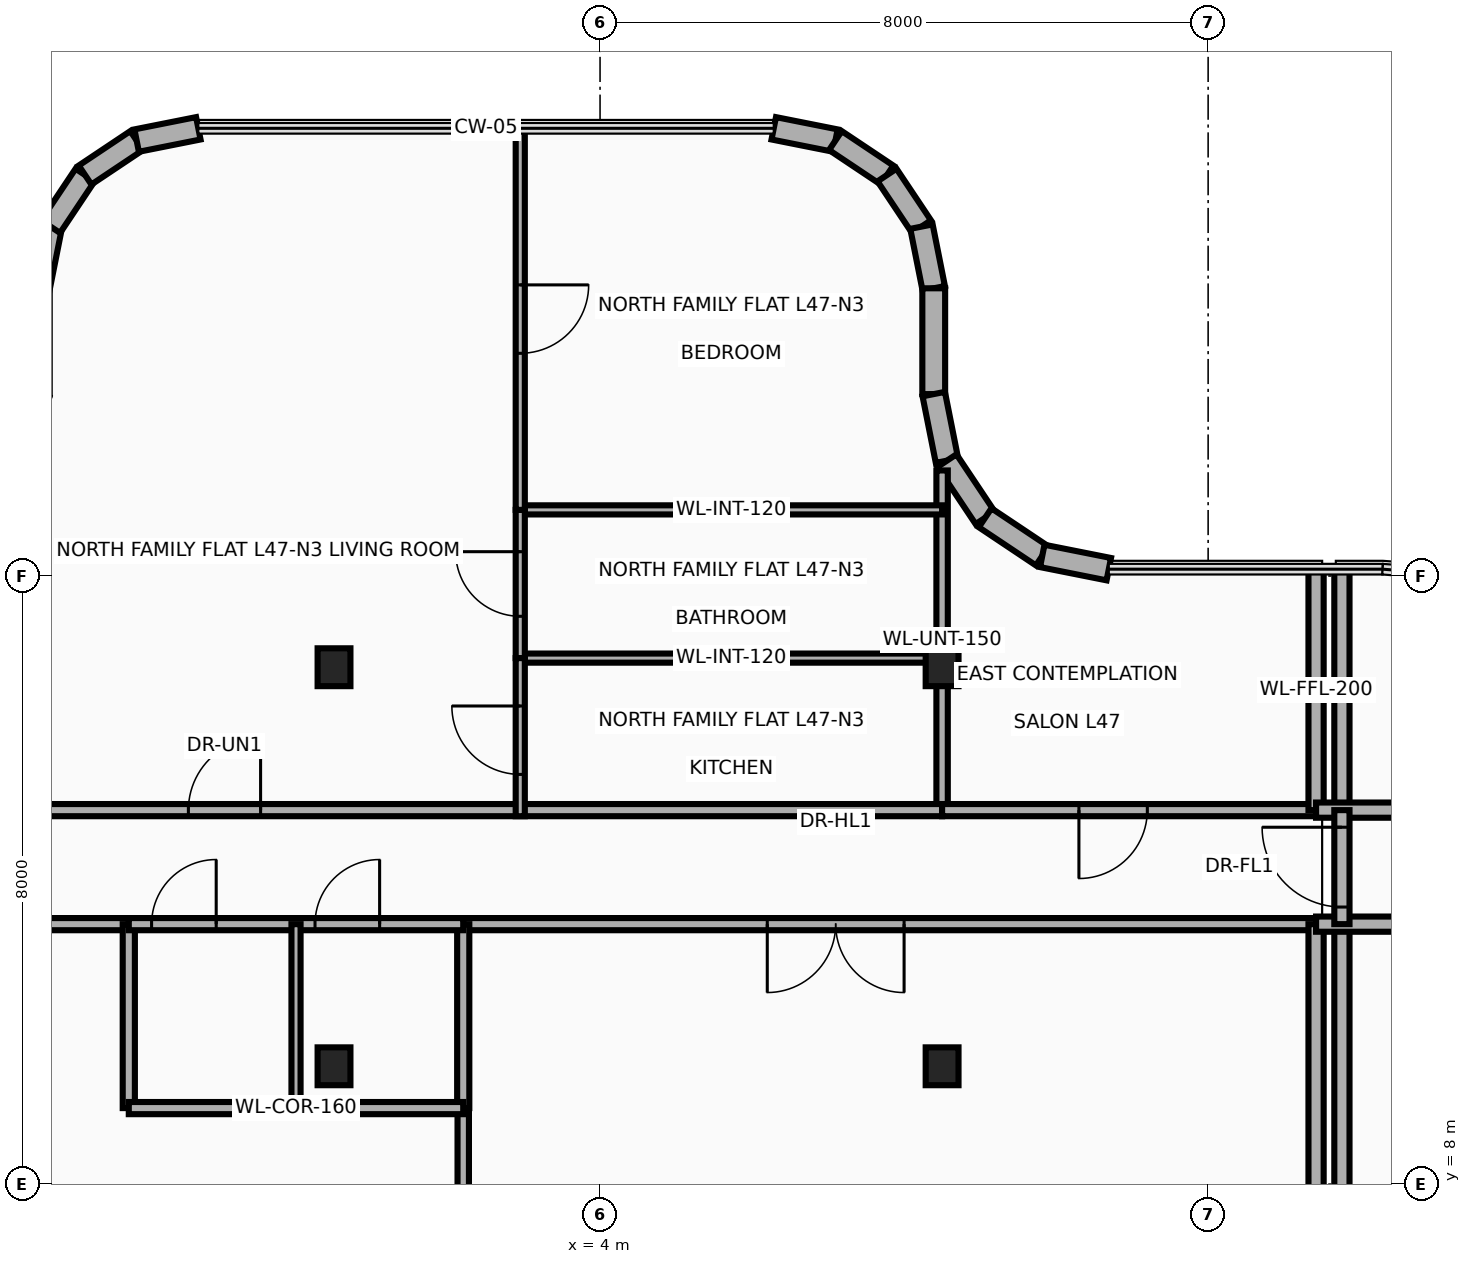
"""IFC4 building model, lengths in metres.
Left out: names, types, materials, properties, quantities, classifications, styles, units other than length and angle.
Written with IfcOpenShell. Run it as: python <this file> out.ifc"""

import sys

from ifc_helpers import new_model, si_unit, direction, frame, frame_2d, origin, origin_2d, place, context, subcontext, project, spatial, rectangle, i_section, extrude, source, transform, mapped, element, fill, save


model = new_model("IFC4")
c1 = context("Model", 3, precision=1e-05, world=origin(), true_north=direction((0.0, 1.0)))
c2 = subcontext(c1, "Body", "Model", "MODEL_VIEW")
j1 = project(units=[si_unit("LENGTHUNIT", "METRE"), si_unit("PLANEANGLEUNIT", "RADIAN")], contexts=[c1])
p1 = place(None, origin())
s1 = spatial("IfcSite", under=j1, at=p1, CompositionType="ELEMENT")
p2 = place(p1, origin())
s2 = spatial("IfcBuilding", under=s1, at=p2, CompositionType="ELEMENT")
p3 = place(p2, frame((0.0, 0.0, 184.45)))
s3 = spatial("IfcBuildingStorey", under=s2, at=p3, CompositionType="ELEMENT", Elevation=184.45)
m1 = source(origin(), c2, "Body", "SweptSolid", [
    extrude(i_section(OverallWidth=0.432, OverallDepth=0.498, WebThickness=0.056, FlangeThickness=0.089, at=origin_2d()), origin(), (0.0, 0.0, 1.0), 3.95),
])
for number, where, z_axis, x_axis in (
    (1, (8.5, 9.55, 0.0), (0.0, 0.0, 1.0), (1.0, 0.0, 0.0)),
    (2, (8.5, 14.8, 0.0), (0.0, 0.0, 1.0), (1.0, 0.0, 0.0)),
    (3, (0.5, 9.55, 0.0), (0.0, 0.0, 1.0), (1.0, 0.0, 0.0)),
    (4, (0.5, 14.8, 0.0), (0.0, 0.0, 1.0), (1.0, 0.0, 0.0)),
):
    element("IfcColumn", number, at=place(p3, frame(where, z_axis=z_axis, x_axis=x_axis)), inside=s3, PredefinedType="COLUMN", context=c2, shape_type="MappedRepresentation", body=[
        mapped(m1, transform((0.0, 0.0, 0.0), x_axis=(1.0, 0.0, 0.0), y_axis=(0.0, 1.0, 0.0), z_axis=(0.0, 0.0, 1.0), scale=1.0)),
    ])
p4 = place(p3, frame((-3.39, 19.785, 0.0), z_axis=(0.0, 0.0, 1.0), x_axis=(0.195094354541, 0.980784478276, 0.0)))
e5 = element("IfcWall", 5, at=p4, inside=s3, PredefinedType="SOLIDWALL", context=c2, shape_type="SweptSolid", body=[
    extrude(rectangle(XDim=0.827, YDim=0.3, at=frame_2d((0.414, 0.0))), origin(), (0.0, 0.0, 1.0), 2.615),
])
p5 = place(p3, frame((-3.229, 20.596, 0.0), z_axis=(0.0, 0.0, 1.0), x_axis=(0.55545926088, 0.831543750805, 0.0)))
e6 = element("IfcWall", 6, at=p5, inside=s3, PredefinedType="SOLIDWALL", context=c2, shape_type="SweptSolid", body=[
    extrude(rectangle(XDim=0.816, YDim=0.3, at=frame_2d((0.408, 0.0))), origin(), (0.0, 0.0, 1.0), 2.615),
])
p6 = place(p3, frame((-2.775, 21.275, 0.0), z_axis=(0.0, 0.0, 1.0), x_axis=(0.831543750805, 0.55545926088, 0.0)))
e7 = element("IfcWall", 7, at=p6, inside=s3, PredefinedType="SOLIDWALL", context=c2, shape_type="SweptSolid", body=[
    extrude(rectangle(XDim=0.816, YDim=0.3, at=frame_2d((0.408, 0.0))), origin(), (0.0, 0.0, 1.0), 3.63),
])
for number, where, z_axis, x_axis in (
    (8, (-2.096, 21.729, 0.0), (0.0, 0.0, 1.0), (0.981, 0.195, 0.0)),
    (9, (6.285, 21.89, 0.0), (0.0, 0.0, 1.0), (0.981, -0.195, 0.0)),
):
    element("IfcWall", number, at=place(p3, frame(where, z_axis=z_axis, x_axis=x_axis)), inside=s3, PredefinedType="SOLIDWALL", context=c2, shape_type="SweptSolid", body=[
        extrude(rectangle(XDim=0.827, YDim=0.3, at=frame_2d((0.414, 0.0))), origin(), (0.0, 0.0, 1.0), 3.076),
    ])
p7 = place(p3, frame((7.096, 21.729, 0.0), z_axis=(0.0, 0.0, 1.0), x_axis=(0.831543750805, -0.55545926088, 0.0)))
e10 = element("IfcWall", 10, at=p7, inside=s3, PredefinedType="SOLIDWALL", context=c2, shape_type="SweptSolid", body=[
    extrude(rectangle(XDim=0.816, YDim=0.3, at=frame_2d((0.408, 0.0))), origin(), (0.0, 0.0, 1.0), 3.63),
])
p8 = place(p3, frame((7.775, 21.275, 0.0), z_axis=(0.0, 0.0, 1.0), x_axis=(0.55545926088, -0.831543750805, 0.0)))
e11 = element("IfcWall", 11, at=p8, inside=s3, PredefinedType="SOLIDWALL", context=c2, shape_type="SweptSolid", body=[
    extrude(rectangle(XDim=0.816, YDim=0.3, at=frame_2d((0.408, 0.0))), origin(), (0.0, 0.0, 1.0), 2.615),
])
p9 = place(p3, frame((8.229, 20.596, 0.0), z_axis=(0.0, 0.0, 1.0), x_axis=(0.195094354541, -0.980784478276, 0.0)))
e12 = element("IfcWall", 12, at=p9, inside=s3, PredefinedType="SOLIDWALL", context=c2, shape_type="SweptSolid", body=[
    extrude(rectangle(XDim=0.827, YDim=0.3, at=frame_2d((0.414, 0.0))), origin(), (0.0, 0.0, 1.0), 2.615),
])
p10 = place(p3, frame((8.39, 19.785, 0.0), z_axis=(0.0, 0.0, 1.0), x_axis=(0.0, -1.0, 0.0)))
e13 = element("IfcWall", 13, at=p10, inside=s3, PredefinedType="SOLIDWALL", context=c2, shape_type="SweptSolid", body=[
    extrude(rectangle(XDim=1.392, YDim=0.3, at=frame_2d((0.696, 0.0))), origin(), (0.0, 0.0, 1.0), 2.615),
])
p11 = place(p3, frame((8.39, 18.393, 0.0), z_axis=(0.0, 0.0, 1.0), x_axis=(0.195222179208, -0.980759043163, 0.0)))
e14 = element("IfcWall", 14, at=p11, inside=s3, PredefinedType="SOLIDWALL", context=c2, shape_type="SweptSolid", body=[
    extrude(rectangle(XDim=0.893, YDim=0.3, at=frame_2d((0.446, 0.0))), origin(), (0.0, 0.0, 1.0), 2.615),
])
for number, where, z_axis, x_axis in (
    (15, (8.564, 17.518, 0.0), (0.0, 0.0, 1.0), (0.555, -0.832, 0.0)),
    (16, (9.066, 16.766, 0.0), (0.0, 0.0, 1.0), (0.832, -0.555, 0.0)),
):
    element("IfcWall", number, at=place(p3, frame(where, z_axis=z_axis, x_axis=x_axis)), inside=s3, PredefinedType="SOLIDWALL", context=c2, shape_type="SweptSolid", body=[
        extrude(rectangle(XDim=0.904, YDim=0.3, at=frame_2d((0.452, 0.0))), origin(), (0.0, 0.0, 1.0), 2.615),
    ])
p12 = place(p3, frame((9.818, 16.264, 0.0), z_axis=(0.0, 0.0, 1.0), x_axis=(0.980800964186, -0.195011457743, 0.0)))
e17 = element("IfcWall", 17, at=p12, inside=s3, PredefinedType="SOLIDWALL", context=c2, shape_type="SweptSolid", body=[
    extrude(rectangle(XDim=0.893, YDim=0.3, at=frame_2d((0.446, 0.0))), origin(), (0.0, 0.0, 1.0), 3.63),
])
p13 = place(p3, frame((8.5, 12.92, 0.0), z_axis=(0.0, 0.0, 1.0), x_axis=(0.0, 1.0, 0.0)))
e18 = element("IfcWall", 18, at=p13, inside=s3, PredefinedType="PARTITIONING", context=c2, shape_type="SweptSolid", body=[
    extrude(rectangle(XDim=4.469, YDim=0.15, at=frame_2d((2.234, 0.0))), origin(), (0.0, 0.0, 1.0), 2.615),
])
p14 = place(p3, frame((-28.25, 12.92, 0.0), z_axis=(0.0, 0.0, 1.0), x_axis=(1.0, 0.0, 0.0)))
e19 = element("IfcWall", 19, at=p14, inside=s3, PredefinedType="PARTITIONING", context=c2, shape_type="SweptSolid", body=[
    extrude(rectangle(XDim=36.75, YDim=0.16, at=frame_2d((18.375, 0.0))), origin(), (0.0, 0.0, 1.0), 2.615),
])
p15 = place(p14, frame((0.973, 0.0, 0.0)))
e20 = element("IfcOpeningElement", 20, at=p15, cuts=e19, PredefinedType="OPENING", context=c2, shape_type="SweptSolid", body=[
    extrude(rectangle(XDim=0.95, YDim=2.15, at=frame_2d((0.475, 1.075))), frame((0.0, 0.095, 0.0), z_axis=(0.0, -1.0, 0.0), x_axis=(1.0, 0.0, 0.0)), (0.0, 0.0, 1.0), 0.19),
])
p16 = place(p14, frame((4.915, 0.0, 0.0)))
e21 = element("IfcOpeningElement", 21, at=p16, cuts=e19, PredefinedType="OPENING", context=c2, shape_type="SweptSolid", body=[
    extrude(rectangle(XDim=0.95, YDim=2.15, at=frame_2d((0.475, 1.075))), frame((0.0, 0.095, 0.0), z_axis=(0.0, -1.0, 0.0), x_axis=(1.0, 0.0, 0.0)), (0.0, 0.0, 1.0), 0.19),
])
p17 = place(p14, frame((13.5, 0.0, 0.0)))
e22 = element("IfcOpeningElement", 22, at=p17, cuts=e19, PredefinedType="OPENING", context=c2, shape_type="SweptSolid", body=[
    extrude(rectangle(XDim=0.95, YDim=2.15, at=frame_2d((0.475, 1.075))), frame((0.0, 0.095, 0.0), z_axis=(0.0, -1.0, 0.0), x_axis=(1.0, 0.0, 0.0)), (0.0, 0.0, 1.0), 0.19),
])
p18 = place(p14, frame((26.834, 0.0, 0.0)))
e23 = element("IfcOpeningElement", 23, at=p18, cuts=e19, PredefinedType="OPENING", context=c2, shape_type="SweptSolid", body=[
    extrude(rectangle(XDim=0.95, YDim=2.15, at=frame_2d((0.475, 1.075))), frame((0.0, 0.095, 0.0), z_axis=(0.0, -1.0, 0.0), x_axis=(1.0, 0.0, 0.0)), (0.0, 0.0, 1.0), 0.19),
])
for number, where, z_axis, x_axis in (
    (24, (2.95, 14.92, 0.0), (0.0, 0.0, 1.0), (1.0, 0.0, 0.0)),
    (25, (2.95, 16.87, 0.0), (0.0, 0.0, 1.0), (1.0, 0.0, 0.0)),
):
    element("IfcWall", number, at=place(p3, frame(where, z_axis=z_axis, x_axis=x_axis)), inside=s3, PredefinedType="PARTITIONING", context=c2, shape_type="SweptSolid", body=[
        extrude(rectangle(XDim=5.55, YDim=0.12, at=frame_2d((2.775, 0.0))), origin(), (0.0, 0.0, 1.0), 2.615),
    ])
p19 = place(p3, frame((2.95, 14.92, 0.0), z_axis=(0.0, 0.0, 1.0), x_axis=(0.0, 1.0, 0.0)))
e26 = element("IfcWall", 26, at=p19, inside=s3, PredefinedType="PARTITIONING", context=c2, shape_type="SweptSolid", body=[
    extrude(rectangle(XDim=1.95, YDim=0.12, at=frame_2d((0.975, 0.0))), origin(), (0.0, 0.0, 1.0), 2.665),
])
p20 = place(p19, frame((0.55, 0.0, 0.0)))
e27 = element("IfcOpeningElement", 27, at=p20, cuts=e26, PredefinedType="OPENING", context=c2, shape_type="SweptSolid", body=[
    extrude(rectangle(XDim=0.85, YDim=2.1, at=frame_2d((0.425, 1.05))), frame((0.0, 0.075, 0.0), z_axis=(0.0, -1.0, 0.0), x_axis=(1.0, 0.0, 0.0)), (0.0, 0.0, 1.0), 0.15),
])
p21 = place(p3, frame((2.95, 12.84, 0.0), z_axis=(0.0, 0.0, 1.0), x_axis=(0.0, 1.0, 0.0)))
e28 = element("IfcWall", 28, at=p21, inside=s3, PredefinedType="PARTITIONING", context=c2, shape_type="SweptSolid", body=[
    extrude(rectangle(XDim=2.08, YDim=0.12, at=frame_2d((1.04, 0.0))), origin(), (0.0, 0.0, 1.0), 2.665),
])
p22 = place(p21, frame((0.55, 0.0, 0.0)))
e29 = element("IfcOpeningElement", 29, at=p22, cuts=e28, PredefinedType="OPENING", context=c2, shape_type="SweptSolid", body=[
    extrude(rectangle(XDim=0.9, YDim=2.1, at=frame_2d((0.45, 1.05))), frame((0.0, 0.075, 0.0), z_axis=(0.0, -1.0, 0.0), x_axis=(1.0, 0.0, 0.0)), (0.0, 0.0, 1.0), 0.15),
])
p23 = place(p3, frame((2.95, 16.87, 0.0), z_axis=(0.0, 0.0, 1.0), x_axis=(0.0, 1.0, 0.0)))
e30 = element("IfcWall", 30, at=p23, inside=s3, PredefinedType="PARTITIONING", context=c2, shape_type="SweptSolid", body=[
    extrude(rectangle(XDim=5.02, YDim=0.12, at=frame_2d((2.51, 0.0))), origin(), (0.0, 0.0, 1.0), 3.076),
])
p24 = place(p23, frame((2.06, 0.0, 0.0)))
e31 = element("IfcOpeningElement", 31, at=p24, cuts=e30, PredefinedType="OPENING", context=c2, shape_type="SweptSolid", body=[
    extrude(rectangle(XDim=0.9, YDim=2.1, at=frame_2d((0.45, 1.05))), frame((0.0, 0.075, 0.0), z_axis=(0.0, -1.0, 0.0), x_axis=(1.0, 0.0, 0.0)), (0.0, 0.0, 1.0), 0.15),
])
p25 = place(p3, frame((-10.05, 11.42, 0.0), z_axis=(0.0, 0.0, 1.0), x_axis=(1.0, 0.0, 0.0)))
e32 = element("IfcWall", 32, at=p25, inside=s3, PredefinedType="PARTITIONING", context=c2, shape_type="SweptSolid", body=[
    extrude(rectangle(XDim=7.85, YDim=0.16, at=frame_2d((3.925, 0.0))), origin(), (0.0, 0.0, 1.0), 2.615),
])
p26 = place(p3, frame((2.2, 11.42, 0.0), z_axis=(0.0, 0.0, 1.0), x_axis=(1.0, 0.0, 0.0)))
e33 = element("IfcWall", 33, at=p26, inside=s3, PredefinedType="PARTITIONING", context=c2, shape_type="SweptSolid", body=[
    extrude(rectangle(XDim=11.22, YDim=0.16, at=frame_2d((5.61, 0.0))), origin(), (0.0, 0.0, 1.0), 2.615),
])
p27 = place(p26, frame((4.0, 0.0, 0.0)))
e34 = element("IfcOpeningElement", 34, at=p27, cuts=e33, PredefinedType="OPENING", context=c2, shape_type="SweptSolid", body=[
    extrude(rectangle(XDim=1.8, YDim=2.15, at=frame_2d((0.9, 1.075))), frame((0.0, 0.095, 0.0), z_axis=(0.0, -1.0, 0.0), x_axis=(1.0, 0.0, 0.0)), (0.0, 0.0, 1.0), 0.19),
])
for number, where, z_axis, x_axis in (
    (35, (13.42, -2.0, 0.0), (0.0, 0.0, 1.0), (0.0, 1.0, 0.0)),
    (36, (13.76, -2.0, 0.0), (0.0, 0.0, 1.0), (0.0, 1.0, 0.0)),
):
    element("IfcWall", number, at=place(p3, frame(where, z_axis=z_axis, x_axis=x_axis)), inside=s3, PredefinedType="PARTITIONING", context=c2, shape_type="SweptSolid", body=[
        extrude(rectangle(XDim=13.42, YDim=0.2, at=frame_2d((6.71, 0.0))), origin(), (0.0, 0.0, 1.0), 2.665),
    ])
p28 = place(p3, frame((2.2, -7.09, 0.0), z_axis=(0.0, 0.0, 1.0), x_axis=(0.0, 1.0, 0.0)))
e37 = element("IfcWall", 37, at=p28, inside=s3, PredefinedType="PARTITIONING", context=c2, shape_type="SweptSolid", body=[
    extrude(rectangle(XDim=16.09, YDim=0.15, at=frame_2d((8.045, 0.0))), origin(), (0.0, 0.0, 1.0), 2.665),
])
p29 = place(p28, frame((11.5, 0.0, 0.0)))
e38 = element("IfcOpeningElement", 38, at=p29, cuts=e37, PredefinedType="OPENING", context=c2, shape_type="SweptSolid", body=[
    extrude(rectangle(XDim=0.9, YDim=2.1, at=frame_2d((0.45, 1.05))), frame((0.0, 0.09, 0.0), z_axis=(0.0, -1.0, 0.0), x_axis=(1.0, 0.0, 0.0)), (0.0, 0.0, 1.0), 0.18),
])
for number, where, z_axis, x_axis in (
    (39, (-2.2, 9.0, 0.0), (0.0, 0.0, 1.0), (0.0, 1.0, 0.0)),
    (40, (2.2, 9.0, 0.0), (0.0, 0.0, 1.0), (0.0, 1.0, 0.0)),
):
    element("IfcWall", number, at=place(p3, frame(where, z_axis=z_axis, x_axis=x_axis)), inside=s3, PredefinedType="PARTITIONING", context=c2, shape_type="SweptSolid", body=[
        extrude(rectangle(XDim=2.42, YDim=0.16, at=frame_2d((1.21, 0.0))), origin(), (0.0, 0.0, 1.0), 2.665),
    ])
p30 = place(p3, frame((-2.2, 9.0, 0.0), z_axis=(0.0, 0.0, 1.0), x_axis=(1.0, 0.0, 0.0)))
e41 = element("IfcWall", 41, at=p30, inside=s3, PredefinedType="PARTITIONING", context=c2, shape_type="SweptSolid", body=[
    extrude(rectangle(XDim=4.4, YDim=0.16, at=frame_2d((2.2, 0.0))), origin(), (0.0, 0.0, 1.0), 3.63),
])
p31 = place(p3, frame((-2.2, 11.42, 0.0), z_axis=(0.0, 0.0, 1.0), x_axis=(1.0, 0.0, 0.0)))
e42 = element("IfcWall", 42, at=p31, inside=s3, PredefinedType="PARTITIONING", context=c2, shape_type="SweptSolid", body=[
    extrude(rectangle(XDim=4.4, YDim=0.16, at=frame_2d((2.2, 0.0))), origin(), (0.0, 0.0, 1.0), 3.63),
])
p32 = place(p31, frame((0.3, 0.0, 0.0)))
e43 = element("IfcOpeningElement", 43, at=p32, cuts=e42, PredefinedType="OPENING", context=c2, shape_type="SweptSolid", body=[
    extrude(rectangle(XDim=0.85, YDim=2.1, at=frame_2d((0.425, 1.05))), frame((0.0, 0.095, 0.0), z_axis=(0.0, -1.0, 0.0), x_axis=(1.0, 0.0, 0.0)), (0.0, 0.0, 1.0), 0.19),
])
p33 = place(p31, frame((2.45, 0.0, 0.0)))
e44 = element("IfcOpeningElement", 44, at=p33, cuts=e42, PredefinedType="OPENING", context=c2, shape_type="SweptSolid", body=[
    extrude(rectangle(XDim=0.85, YDim=2.1, at=frame_2d((0.425, 1.05))), frame((0.0, 0.095, 0.0), z_axis=(0.0, -1.0, 0.0), x_axis=(1.0, 0.0, 0.0)), (0.0, 0.0, 1.0), 0.19),
])
p34 = place(p3, frame((0.0, 9.0, 0.0), z_axis=(0.0, 0.0, 1.0), x_axis=(0.0, 1.0, 0.0)))
e45 = element("IfcWall", 45, at=p34, inside=s3, PredefinedType="PARTITIONING", context=c2, shape_type="SweptSolid", body=[
    extrude(rectangle(XDim=2.42, YDim=0.12, at=frame_2d((1.21, 0.0))), origin(), (0.0, 0.0, 1.0), 2.665),
])
p35 = place(p3, frame((8.5, 12.92, 0.0), z_axis=(0.0, 0.0, 1.0), x_axis=(1.0, 0.0, 0.0)))
e46 = element("IfcWall", 46, at=p35, inside=s3, PredefinedType="PARTITIONING", context=c2, shape_type="SweptSolid", body=[
    extrude(rectangle(XDim=4.92, YDim=0.16, at=frame_2d((2.46, 0.0))), origin(), (0.0, 0.0, 1.0), 2.615),
])
p36 = place(p35, frame((1.8, 0.0, 0.0)))
e47 = element("IfcOpeningElement", 47, at=p36, cuts=e46, PredefinedType="OPENING", context=c2, shape_type="SweptSolid", body=[
    extrude(rectangle(XDim=0.9, YDim=2.1, at=frame_2d((0.45, 1.05))), frame((0.0, 0.095, 0.0), z_axis=(0.0, -1.0, 0.0), x_axis=(1.0, 0.0, 0.0)), (0.0, 0.0, 1.0), 0.19),
])
for number, where, z_axis, x_axis in (
    (48, (13.42, 12.92, 0.0), (0.0, 0.0, 1.0), (0.0, 1.0, 0.0)),
    (49, (13.76, 12.92, 0.0), (0.0, 0.0, 1.0), (0.0, 1.0, 0.0)),
):
    element("IfcWall", number, at=place(p3, frame(where, z_axis=z_axis, x_axis=x_axis)), inside=s3, PredefinedType="PARTITIONING", context=c2, shape_type="SweptSolid", body=[
        extrude(rectangle(XDim=3.17, YDim=0.2, at=frame_2d((1.585, 0.0))), origin(), (0.0, 0.0, 1.0), 2.665),
    ])
for number, where, z_axis, x_axis in (
    (50, (13.42, 12.92, 0.0), (0.0, 0.0, 1.0), (1.0, 0.0, 0.0)),
    (51, (13.42, 11.42, 0.0), (0.0, 0.0, 1.0), (1.0, 0.0, 0.0)),
):
    element("IfcWall", number, at=place(p3, frame(where, z_axis=z_axis, x_axis=x_axis)), inside=s3, PredefinedType="PARTITIONING", context=c2, shape_type="SweptSolid", body=[
        extrude(rectangle(XDim=1.98, YDim=0.2, at=frame_2d((0.99, 0.0))), origin(), (0.0, 0.0, 1.0), 3.004),
    ])
p37 = place(p3, frame((13.76, 11.42, 0.0), z_axis=(0.0, 0.0, 1.0), x_axis=(0.0, 1.0, 0.0)))
e52 = element("IfcWall", 52, at=p37, inside=s3, PredefinedType="PARTITIONING", context=c2, shape_type="SweptSolid", body=[
    extrude(rectangle(XDim=1.5, YDim=0.2, at=frame_2d((0.75, 0.0))), origin(), (0.0, 0.0, 1.0), 3.004),
])
p38 = place(p37, frame((0.225, 0.0, 0.0)))
e53 = element("IfcOpeningElement", 53, at=p38, cuts=e52, PredefinedType="OPENING", context=c2, shape_type="SweptSolid", body=[
    extrude(rectangle(XDim=1.05, YDim=2.15, at=frame_2d((0.525, 1.075))), frame((0.0, 0.115, 0.0), z_axis=(0.0, -1.0, 0.0), x_axis=(1.0, 0.0, 0.0)), (0.0, 0.0, 1.0), 0.23),
])
p39 = place(p18, origin())
e54 = element("IfcDoor", 54, at=p39, inside=s3, OperationType="SINGLE_SWING_RIGHT", PredefinedType="DOOR", context=c2, shape_type="SweptSolid", body=[
    extrude(rectangle(XDim=0.95, YDim=2.15, at=frame_2d((0.475, 1.075))), frame((0.0, 0.025, 0.0), z_axis=(0.0, -1.0, 0.0), x_axis=(1.0, 0.0, 0.0)), (0.0, 0.0, 1.0), 0.05),
])
fill(e23, e54)
p40 = place(p20, origin())
e55 = element("IfcDoor", 55, at=p40, inside=s3, OperationType="SINGLE_SWING_LEFT", PredefinedType="DOOR", context=c2, shape_type="SweptSolid", body=[
    extrude(rectangle(XDim=0.85, YDim=2.1, at=frame_2d((0.425, 1.05))), frame((0.0, 0.025, 0.0), z_axis=(0.0, -1.0, 0.0), x_axis=(1.0, 0.0, 0.0)), (0.0, 0.0, 1.0), 0.05),
])
fill(e27, e55)
p41 = place(p22, origin())
e56 = element("IfcDoor", 56, at=p41, inside=s3, OperationType="SINGLE_SWING_RIGHT", PredefinedType="DOOR", context=c2, shape_type="SweptSolid", body=[
    extrude(rectangle(XDim=0.9, YDim=2.1, at=frame_2d((0.45, 1.05))), frame((0.0, 0.025, 0.0), z_axis=(0.0, -1.0, 0.0), x_axis=(1.0, 0.0, 0.0)), (0.0, 0.0, 1.0), 0.05),
])
fill(e29, e56)
p42 = place(p24, frame((0.9, 0.0, 0.0), z_axis=(0.0, 0.0, 1.0), x_axis=(-1.0, 0.0, 0.0)))
e57 = element("IfcDoor", 57, at=p42, inside=s3, OperationType="SINGLE_SWING_LEFT", PredefinedType="DOOR", context=c2, shape_type="SweptSolid", body=[
    extrude(rectangle(XDim=0.9, YDim=2.1, at=frame_2d((0.45, 1.05))), frame((0.0, 0.025, 0.0), z_axis=(0.0, -1.0, 0.0), x_axis=(1.0, 0.0, 0.0)), (0.0, 0.0, 1.0), 0.05),
])
fill(e31, e57)
p43 = place(p27, frame((1.8, 0.0, 0.0), z_axis=(0.0, 0.0, 1.0), x_axis=(-1.0, 0.0, 0.0)))
e58 = element("IfcDoor", 58, at=p43, inside=s3, OperationType="DOUBLE_DOOR_SINGLE_SWING", PredefinedType="DOOR", context=c2, shape_type="SweptSolid", body=[
    extrude(rectangle(XDim=1.8, YDim=2.15, at=frame_2d((0.9, 1.075))), frame((0.0, 0.025, 0.0), z_axis=(0.0, -1.0, 0.0), x_axis=(1.0, 0.0, 0.0)), (0.0, 0.0, 1.0), 0.05),
])
fill(e34, e58)
p44 = place(p32, origin())
e59 = element("IfcDoor", 59, at=p44, inside=s3, OperationType="SINGLE_SWING_LEFT", PredefinedType="DOOR", context=c2, shape_type="SweptSolid", body=[
    extrude(rectangle(XDim=0.85, YDim=2.1, at=frame_2d((0.425, 1.05))), frame((0.0, 0.025, 0.0), z_axis=(0.0, -1.0, 0.0), x_axis=(1.0, 0.0, 0.0)), (0.0, 0.0, 1.0), 0.05),
])
fill(e43, e59)
p45 = place(p33, origin())
e60 = element("IfcDoor", 60, at=p45, inside=s3, OperationType="SINGLE_SWING_RIGHT", PredefinedType="DOOR", context=c2, shape_type="SweptSolid", body=[
    extrude(rectangle(XDim=0.85, YDim=2.1, at=frame_2d((0.425, 1.05))), frame((0.0, 0.025, 0.0), z_axis=(0.0, -1.0, 0.0), x_axis=(1.0, 0.0, 0.0)), (0.0, 0.0, 1.0), 0.05),
])
fill(e44, e60)
p46 = place(p36, frame((0.9, 0.0, 0.0), z_axis=(0.0, 0.0, 1.0), x_axis=(-1.0, 0.0, 0.0)))
e61 = element("IfcDoor", 61, at=p46, inside=s3, OperationType="SINGLE_SWING_LEFT", PredefinedType="DOOR", context=c2, shape_type="SweptSolid", body=[
    extrude(rectangle(XDim=0.9, YDim=2.1, at=frame_2d((0.45, 1.05))), frame((0.0, 0.025, 0.0), z_axis=(0.0, -1.0, 0.0), x_axis=(1.0, 0.0, 0.0)), (0.0, 0.0, 1.0), 0.05),
])
fill(e47, e61)
p47 = place(p38, origin())
e62 = element("IfcDoor", 62, at=p47, inside=s3, OperationType="SINGLE_SWING_LEFT", PredefinedType="DOOR", context=c2, shape_type="SweptSolid", body=[
    extrude(rectangle(XDim=1.05, YDim=2.15, at=frame_2d((0.525, 1.075))), frame((0.0, 0.025, 0.0), z_axis=(0.0, -1.0, 0.0), x_axis=(1.0, 0.0, 0.0)), (0.0, 0.0, 1.0), 0.05),
])
fill(e53, e62)
save(model, sys.argv[1])
